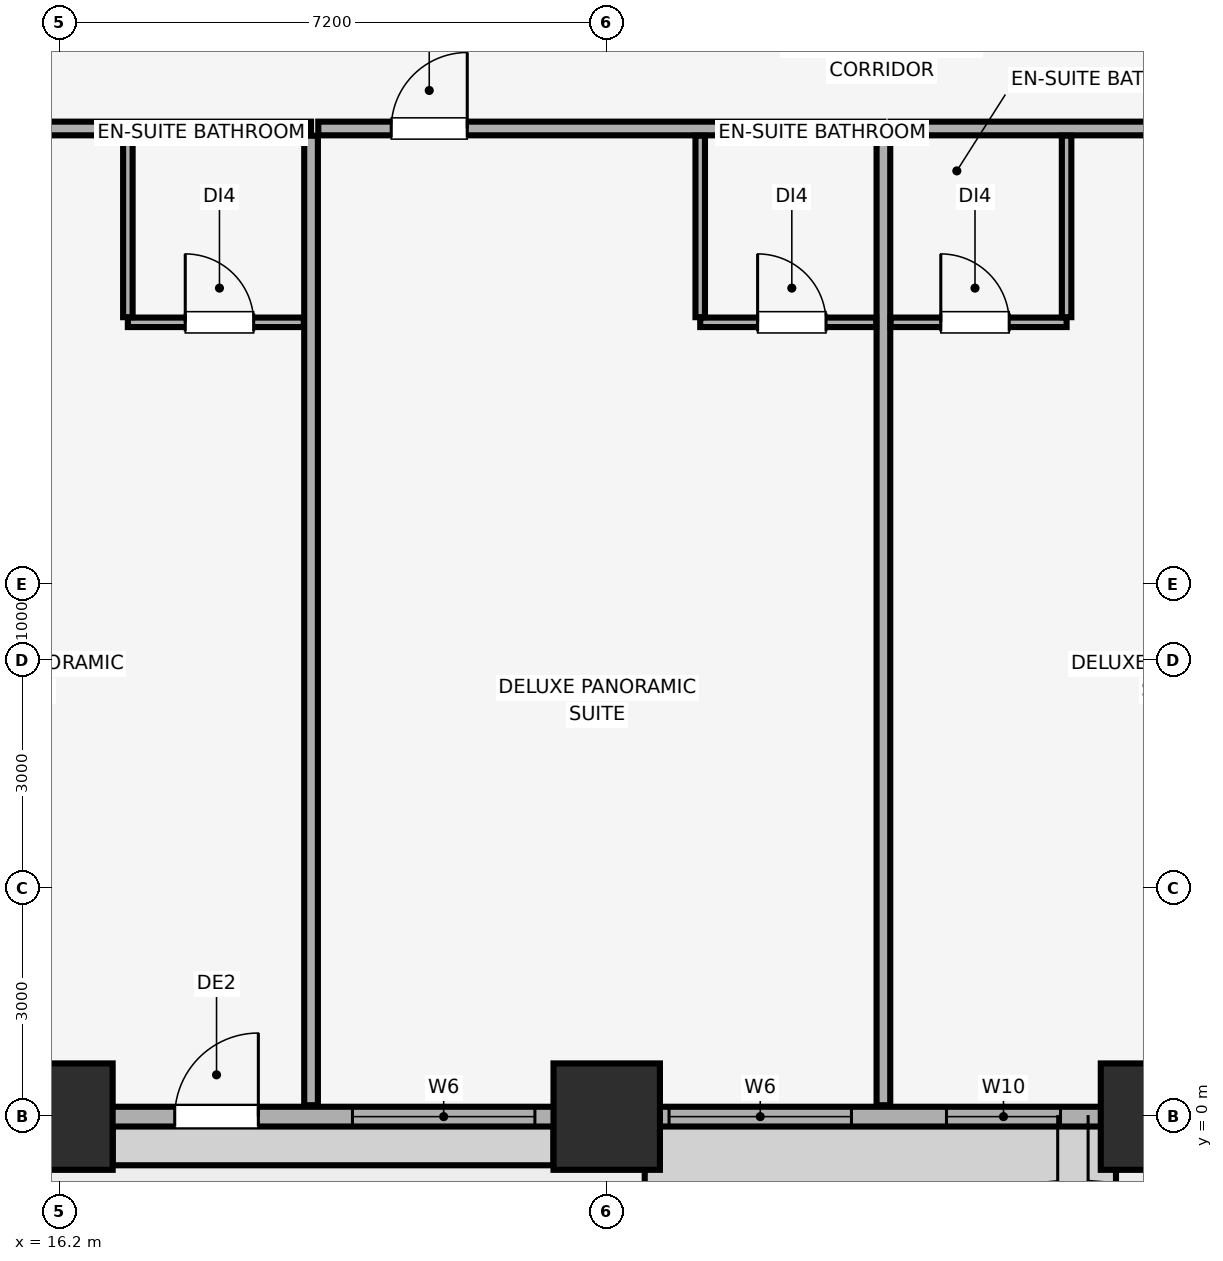
"""IFC4 building model, lengths in metres.
Left out: names, types, materials, properties, quantities, classifications, styles, units other than length and angle.
Written with IfcOpenShell. Run it as: python <this file> out.ifc"""

import sys

from ifc_helpers import new_model, si_unit, direction, frame, frame_2d, origin, origin_2d, place, context, subcontext, project, spatial, rectangle, extrude, element, fill, save


model = new_model("IFC4")
c1 = context("Model", 3, precision=1e-05, world=origin(), true_north=direction((0.0, 1.0)))
c2 = subcontext(c1, "Body", "Model", "MODEL_VIEW")
j1 = project(units=[si_unit("LENGTHUNIT", "METRE"), si_unit("PLANEANGLEUNIT", "RADIAN")], contexts=[c1])
p1 = place(None, origin())
s1 = spatial("IfcSite", under=j1, at=p1, CompositionType="ELEMENT")
p2 = place(p1, origin())
s2 = spatial("IfcBuilding", under=s1, at=p2, CompositionType="ELEMENT")
p3 = place(p2, frame((0.0, 0.0, 68.9)))
s3 = spatial("IfcBuildingStorey", under=s2, at=p3, CompositionType="ELEMENT", Elevation=68.9)
for number, where, z_axis, x_axis in (
    (1, (16.2, 0.0, 0.0), (0.0, 0.0, 1.0), (1.0, 0.0, 0.0)),
    (2, (23.4, 0.0, 0.0), (0.0, 0.0, 1.0), (1.0, 0.0, 0.0)),
    (3, (30.6, 0.0, 0.0), (0.0, 0.0, 1.0), (1.0, 0.0, 0.0)),
):
    element("IfcColumn", number, at=place(p3, frame(where, z_axis=z_axis, x_axis=x_axis)), inside=s3, PredefinedType="COLUMN", context=c2, shape_type="SweptSolid", body=[
        extrude(rectangle(XDim=1.4, YDim=1.4, at=origin_2d()), origin(), (0.0, 0.0, 1.0), 3.51),
    ])
p4 = place(p3, frame((4.2, 0.0, 0.0), z_axis=(0.0, 0.0, 1.0), x_axis=(1.0, 0.0, 0.0)))
e4 = element("IfcWall", 4, at=p4, inside=s3, PredefinedType="SOLIDWALL", context=c2, shape_type="SweptSolid", body=[
    extrude(rectangle(XDim=75.6, YDim=0.26, at=frame_2d((37.8, 0.0))), origin(), (0.0, 0.0, 1.0), 2.56),
])
p5 = place(p4, frame((13.517, 0.0, 0.0)))
e5 = element("IfcOpeningElement", 5, at=p5, cuts=e4, PredefinedType="OPENING", context=c2, shape_type="SweptSolid", body=[
    extrude(rectangle(XDim=1.1, YDim=2.15, at=frame_2d((0.55, 1.075))), frame((0.0, 0.14, 0.0), z_axis=(0.0, -1.0, 0.0), x_axis=(1.0, 0.0, 0.0)), (0.0, 0.0, 1.0), 0.28),
])
p6 = place(p4, frame((28.183, 0.0, 0.0)))
e6 = element("IfcOpeningElement", 6, at=p6, cuts=e4, PredefinedType="OPENING", context=c2, shape_type="SweptSolid", body=[
    extrude(rectangle(XDim=1.1, YDim=2.15, at=frame_2d((0.55, 1.075))), frame((0.0, 0.14, 0.0), z_axis=(0.0, -1.0, 0.0), x_axis=(1.0, 0.0, 0.0)), (0.0, 0.0, 1.0), 0.28),
])
p7 = place(p4, frame((58.094, 0.0, 0.0)))
e7 = element("IfcOpeningElement", 7, at=p7, cuts=e4, PredefinedType="OPENING", context=c2, shape_type="SweptSolid", body=[
    extrude(rectangle(XDim=1.1, YDim=2.15, at=frame_2d((0.55, 1.075))), frame((0.0, 0.14, 0.0), z_axis=(0.0, -1.0, 0.0), x_axis=(1.0, 0.0, 0.0)), (0.0, 0.0, 1.0), 0.28),
])
p8 = place(p4, frame((1.035, 0.0, 0.85)))
e8 = element("IfcOpeningElement", 8, at=p8, cuts=e4, PredefinedType="OPENING", context=c2, shape_type="SweptSolid", body=[
    extrude(rectangle(XDim=2.4, YDim=1.5, at=frame_2d((1.2, 0.75))), frame((0.0, 0.14, 0.0), z_axis=(0.0, -1.0, 0.0), x_axis=(1.0, 0.0, 0.0)), (0.0, 0.0, 1.0), 0.28),
])
p9 = place(p4, frame((5.74, 0.0, 0.85)))
e9 = element("IfcOpeningElement", 9, at=p9, cuts=e4, PredefinedType="OPENING", context=c2, shape_type="SweptSolid", body=[
    extrude(rectangle(XDim=1.5, YDim=1.4, at=frame_2d((0.75, 0.7))), frame((0.0, 0.14, 0.0), z_axis=(0.0, -1.0, 0.0), x_axis=(1.0, 0.0, 0.0)), (0.0, 0.0, 1.0), 0.28),
])
p10 = place(p4, frame((8.49, 0.0, 0.85)))
e10 = element("IfcOpeningElement", 10, at=p10, cuts=e4, PredefinedType="OPENING", context=c2, shape_type="SweptSolid", body=[
    extrude(rectangle(XDim=2.4, YDim=1.5, at=frame_2d((1.2, 0.75))), frame((0.0, 0.14, 0.0), z_axis=(0.0, -1.0, 0.0), x_axis=(1.0, 0.0, 0.0)), (0.0, 0.0, 1.0), 0.28),
])
p11 = place(p4, frame((15.855, 0.0, 0.85)))
e11 = element("IfcOpeningElement", 11, at=p11, cuts=e4, PredefinedType="OPENING", context=c2, shape_type="SweptSolid", body=[
    extrude(rectangle(XDim=2.4, YDim=1.5, at=frame_2d((1.2, 0.75))), frame((0.0, 0.14, 0.0), z_axis=(0.0, -1.0, 0.0), x_axis=(1.0, 0.0, 0.0)), (0.0, 0.0, 1.0), 0.28),
])
p12 = place(p4, frame((20.02, 0.0, 0.85)))
e12 = element("IfcOpeningElement", 12, at=p12, cuts=e4, PredefinedType="OPENING", context=c2, shape_type="SweptSolid", body=[
    extrude(rectangle(XDim=2.4, YDim=1.5, at=frame_2d((1.2, 0.75))), frame((0.0, 0.14, 0.0), z_axis=(0.0, -1.0, 0.0), x_axis=(1.0, 0.0, 0.0)), (0.0, 0.0, 1.0), 0.28),
])
p13 = place(p4, frame((23.67, 0.0, 0.85)))
e13 = element("IfcOpeningElement", 13, at=p13, cuts=e4, PredefinedType="OPENING", context=c2, shape_type="SweptSolid", body=[
    extrude(rectangle(XDim=1.5, YDim=1.4, at=frame_2d((0.75, 0.7))), frame((0.0, 0.14, 0.0), z_axis=(0.0, -1.0, 0.0), x_axis=(1.0, 0.0, 0.0)), (0.0, 0.0, 1.0), 0.28),
])
p14 = place(p4, frame((31.035, 0.0, 0.85)))
e14 = element("IfcOpeningElement", 14, at=p14, cuts=e4, PredefinedType="OPENING", context=c2, shape_type="SweptSolid", body=[
    extrude(rectangle(XDim=1.5, YDim=1.4, at=frame_2d((0.75, 0.7))), frame((0.0, 0.14, 0.0), z_axis=(0.0, -1.0, 0.0), x_axis=(1.0, 0.0, 0.0)), (0.0, 0.0, 1.0), 0.28),
])
p15 = place(p4, frame((34.75, 0.0, 0.85)))
e15 = element("IfcOpeningElement", 15, at=p15, cuts=e4, PredefinedType="OPENING", context=c2, shape_type="SweptSolid", body=[
    extrude(rectangle(XDim=2.4, YDim=1.5, at=frame_2d((1.2, 0.75))), frame((0.0, 0.14, 0.0), z_axis=(0.0, -1.0, 0.0), x_axis=(1.0, 0.0, 0.0)), (0.0, 0.0, 1.0), 0.28),
])
p16 = place(p4, frame((38.55, 0.0, 0.85)))
e16 = element("IfcOpeningElement", 16, at=p16, cuts=e4, PredefinedType="OPENING", context=c2, shape_type="SweptSolid", body=[
    extrude(rectangle(XDim=2.4, YDim=1.5, at=frame_2d((1.2, 0.75))), frame((0.0, 0.14, 0.0), z_axis=(0.0, -1.0, 0.0), x_axis=(1.0, 0.0, 0.0)), (0.0, 0.0, 1.0), 0.28),
])
p17 = place(p4, frame((43.165, 0.0, 0.85)))
e17 = element("IfcOpeningElement", 17, at=p17, cuts=e4, PredefinedType="OPENING", context=c2, shape_type="SweptSolid", body=[
    extrude(rectangle(XDim=1.5, YDim=1.4, at=frame_2d((0.75, 0.7))), frame((0.0, 0.14, 0.0), z_axis=(0.0, -1.0, 0.0), x_axis=(1.0, 0.0, 0.0)), (0.0, 0.0, 1.0), 0.28),
])
p18 = place(p4, frame((45.915, 0.0, 0.85)))
e18 = element("IfcOpeningElement", 18, at=p18, cuts=e4, PredefinedType="OPENING", context=c2, shape_type="SweptSolid", body=[
    extrude(rectangle(XDim=2.4, YDim=1.5, at=frame_2d((1.2, 0.75))), frame((0.0, 0.14, 0.0), z_axis=(0.0, -1.0, 0.0), x_axis=(1.0, 0.0, 0.0)), (0.0, 0.0, 1.0), 0.28),
])
p19 = place(p4, frame((50.081, 0.0, 0.85)))
e19 = element("IfcOpeningElement", 19, at=p19, cuts=e4, PredefinedType="OPENING", context=c2, shape_type="SweptSolid", body=[
    extrude(rectangle(XDim=2.4, YDim=1.5, at=frame_2d((1.2, 0.75))), frame((0.0, 0.14, 0.0), z_axis=(0.0, -1.0, 0.0), x_axis=(1.0, 0.0, 0.0)), (0.0, 0.0, 1.0), 0.28),
])
p20 = place(p4, frame((53.73, 0.0, 0.85)))
e20 = element("IfcOpeningElement", 20, at=p20, cuts=e4, PredefinedType="OPENING", context=c2, shape_type="SweptSolid", body=[
    extrude(rectangle(XDim=1.5, YDim=1.4, at=frame_2d((0.75, 0.7))), frame((0.0, 0.14, 0.0), z_axis=(0.0, -1.0, 0.0), x_axis=(1.0, 0.0, 0.0)), (0.0, 0.0, 1.0), 0.28),
])
p21 = place(p4, frame((61.095, 0.0, 0.85)))
e21 = element("IfcOpeningElement", 21, at=p21, cuts=e4, PredefinedType="OPENING", context=c2, shape_type="SweptSolid", body=[
    extrude(rectangle(XDim=1.5, YDim=1.4, at=frame_2d((0.75, 0.7))), frame((0.0, 0.14, 0.0), z_axis=(0.0, -1.0, 0.0), x_axis=(1.0, 0.0, 0.0)), (0.0, 0.0, 1.0), 0.28),
])
p22 = place(p4, frame((64.76, 0.0, 0.85)))
e22 = element("IfcOpeningElement", 22, at=p22, cuts=e4, PredefinedType="OPENING", context=c2, shape_type="SweptSolid", body=[
    extrude(rectangle(XDim=2.4, YDim=1.5, at=frame_2d((1.2, 0.75))), frame((0.0, 0.14, 0.0), z_axis=(0.0, -1.0, 0.0), x_axis=(1.0, 0.0, 0.0)), (0.0, 0.0, 1.0), 0.28),
])
p23 = place(p4, frame((68.41, 0.0, 0.85)))
e23 = element("IfcOpeningElement", 23, at=p23, cuts=e4, PredefinedType="OPENING", context=c2, shape_type="SweptSolid", body=[
    extrude(rectangle(XDim=1.5, YDim=1.4, at=frame_2d((0.75, 0.7))), frame((0.0, 0.14, 0.0), z_axis=(0.0, -1.0, 0.0), x_axis=(1.0, 0.0, 0.0)), (0.0, 0.0, 1.0), 0.28),
])
p24 = place(p4, frame((72.165, 0.0, 0.85)))
e24 = element("IfcOpeningElement", 24, at=p24, cuts=e4, PredefinedType="OPENING", context=c2, shape_type="SweptSolid", body=[
    extrude(rectangle(XDim=2.4, YDim=1.5, at=frame_2d((1.2, 0.75))), frame((0.0, 0.14, 0.0), z_axis=(0.0, -1.0, 0.0), x_axis=(1.0, 0.0, 0.0)), (0.0, 0.0, 1.0), 0.28),
])
p25 = place(p3, frame((12.075, 13.0, 0.0), z_axis=(0.0, 0.0, 1.0), x_axis=(1.0, 0.0, 0.0)))
e25 = element("IfcWall", 25, at=p25, inside=s3, PredefinedType="PARTITIONING", context=c2, shape_type="SweptSolid", body=[
    extrude(rectangle(XDim=7.435, YDim=0.18, at=frame_2d((3.718, 0.0))), origin(), (0.0, 0.0, 1.0), 3.51),
])
p26 = place(p25, frame((1.125, 0.0, 0.0)))
e26 = element("IfcOpeningElement", 26, at=p26, cuts=e25, PredefinedType="OPENING", context=c2, shape_type="SweptSolid", body=[
    extrude(rectangle(XDim=1.0, YDim=2.15, at=frame_2d((0.5, 1.075))), frame((0.0, 0.1, 0.0), z_axis=(0.0, -1.0, 0.0), x_axis=(1.0, 0.0, 0.0)), (0.0, 0.0, 1.0), 0.2),
])
p27 = place(p3, frame((19.51, 0.15, 0.0), z_axis=(0.0, 0.0, 1.0), x_axis=(0.0, 1.0, 0.0)))
e27 = element("IfcWall", 27, at=p27, inside=s3, PredefinedType="PARTITIONING", context=c2, shape_type="SweptSolid", body=[
    extrude(rectangle(XDim=12.755, YDim=0.18, at=frame_2d((6.377, 0.0))), origin(), (0.0, 0.0, 1.0), 3.51),
])
p28 = place(p3, frame((17.1, 10.45, 0.0), z_axis=(0.0, 0.0, 1.0), x_axis=(1.0, 0.0, 0.0)))
e28 = element("IfcWall", 28, at=p28, inside=s3, PredefinedType="PARTITIONING", context=c2, shape_type="SweptSolid", body=[
    extrude(rectangle(XDim=2.315, YDim=0.125, at=frame_2d((1.158, 0.0))), origin(), (0.0, 0.0, 1.0), 3.51),
])
p29 = place(p28, frame((0.755, 0.0, 0.0)))
e29 = element("IfcOpeningElement", 29, at=p29, cuts=e28, PredefinedType="OPENING", context=c2, shape_type="SweptSolid", body=[
    extrude(rectangle(XDim=0.9, YDim=2.1, at=frame_2d((0.45, 1.05))), frame((0.0, 0.073, 0.0), z_axis=(0.0, -1.0, 0.0), x_axis=(1.0, 0.0, 0.0)), (0.0, 0.0, 1.0), 0.145),
])
p30 = place(p3, frame((17.1, 10.518, 0.0), z_axis=(0.0, 0.0, 1.0), x_axis=(0.0, 1.0, 0.0)))
e30 = element("IfcWall", 30, at=p30, inside=s3, PredefinedType="PARTITIONING", context=c2, shape_type="SweptSolid", body=[
    extrude(rectangle(XDim=2.387, YDim=0.125, at=frame_2d((1.194, 0.0))), origin(), (0.0, 0.0, 1.0), 3.51),
])
p31 = place(p3, frame((19.605, 13.0, 0.0), z_axis=(0.0, 0.0, 1.0), x_axis=(1.0, 0.0, 0.0)))
e31 = element("IfcWall", 31, at=p31, inside=s3, PredefinedType="PARTITIONING", context=c2, shape_type="SweptSolid", body=[
    extrude(rectangle(XDim=7.435, YDim=0.18, at=frame_2d((3.718, 0.0))), origin(), (0.0, 0.0, 1.0), 3.51),
])
p32 = place(p31, frame((0.96, 0.0, 0.0)))
e32 = element("IfcOpeningElement", 32, at=p32, cuts=e31, PredefinedType="OPENING", context=c2, shape_type="SweptSolid", body=[
    extrude(rectangle(XDim=1.0, YDim=2.15, at=frame_2d((0.5, 1.075))), frame((0.0, 0.1, 0.0), z_axis=(0.0, -1.0, 0.0), x_axis=(1.0, 0.0, 0.0)), (0.0, 0.0, 1.0), 0.2),
])
p33 = place(p3, frame((27.04, 0.15, 0.0), z_axis=(0.0, 0.0, 1.0), x_axis=(0.0, 1.0, 0.0)))
e33 = element("IfcWall", 33, at=p33, inside=s3, PredefinedType="PARTITIONING", context=c2, shape_type="SweptSolid", body=[
    extrude(rectangle(XDim=12.755, YDim=0.18, at=frame_2d((6.377, 0.0))), origin(), (0.0, 0.0, 1.0), 2.898),
])
p34 = place(p3, frame((24.63, 10.45, 0.0), z_axis=(0.0, 0.0, 1.0), x_axis=(1.0, 0.0, 0.0)))
e34 = element("IfcWall", 34, at=p34, inside=s3, PredefinedType="PARTITIONING", context=c2, shape_type="SweptSolid", body=[
    extrude(rectangle(XDim=2.315, YDim=0.125, at=frame_2d((1.158, 0.0))), origin(), (0.0, 0.0, 1.0), 3.51),
])
p35 = place(p34, frame((0.755, 0.0, 0.0)))
e35 = element("IfcOpeningElement", 35, at=p35, cuts=e34, PredefinedType="OPENING", context=c2, shape_type="SweptSolid", body=[
    extrude(rectangle(XDim=0.9, YDim=2.1, at=frame_2d((0.45, 1.05))), frame((0.0, 0.073, 0.0), z_axis=(0.0, -1.0, 0.0), x_axis=(1.0, 0.0, 0.0)), (0.0, 0.0, 1.0), 0.145),
])
p36 = place(p3, frame((24.63, 10.518, 0.0), z_axis=(0.0, 0.0, 1.0), x_axis=(0.0, 1.0, 0.0)))
e36 = element("IfcWall", 36, at=p36, inside=s3, PredefinedType="PARTITIONING", context=c2, shape_type="SweptSolid", body=[
    extrude(rectangle(XDim=2.387, YDim=0.125, at=frame_2d((1.194, 0.0))), origin(), (0.0, 0.0, 1.0), 3.51),
])
p37 = place(p3, frame((27.135, 13.0, 0.0), z_axis=(0.0, 0.0, 1.0), x_axis=(1.0, 0.0, 0.0)))
e37 = element("IfcWall", 37, at=p37, inside=s3, PredefinedType="PARTITIONING", context=c2, shape_type="SweptSolid", body=[
    extrude(rectangle(XDim=7.435, YDim=0.18, at=frame_2d((3.718, 0.0))), origin(), (0.0, 0.0, 1.0), 3.51),
])
p38 = place(p37, frame((5.34, 0.0, 0.0)))
e38 = element("IfcOpeningElement", 38, at=p38, cuts=e37, PredefinedType="OPENING", context=c2, shape_type="SweptSolid", body=[
    extrude(rectangle(XDim=1.0, YDim=2.15, at=frame_2d((0.5, 1.075))), frame((0.0, 0.1, 0.0), z_axis=(0.0, -1.0, 0.0), x_axis=(1.0, 0.0, 0.0)), (0.0, 0.0, 1.0), 0.2),
])
p39 = place(p3, frame((27.135, 10.45, 0.0), z_axis=(0.0, 0.0, 1.0), x_axis=(1.0, 0.0, 0.0)))
e39 = element("IfcWall", 39, at=p39, inside=s3, PredefinedType="PARTITIONING", context=c2, shape_type="SweptSolid", body=[
    extrude(rectangle(XDim=2.315, YDim=0.125, at=frame_2d((1.157, 0.0))), origin(), (0.0, 0.0, 1.0), 3.51),
])
p40 = place(p39, frame((0.66, 0.0, 0.0)))
e40 = element("IfcOpeningElement", 40, at=p40, cuts=e39, PredefinedType="OPENING", context=c2, shape_type="SweptSolid", body=[
    extrude(rectangle(XDim=0.9, YDim=2.1, at=frame_2d((0.45, 1.05))), frame((0.0, 0.073, 0.0), z_axis=(0.0, -1.0, 0.0), x_axis=(1.0, 0.0, 0.0)), (0.0, 0.0, 1.0), 0.145),
])
p41 = place(p3, frame((29.45, 10.518, 0.0), z_axis=(0.0, 0.0, 1.0), x_axis=(0.0, 1.0, 0.0)))
e41 = element("IfcWall", 41, at=p41, inside=s3, PredefinedType="PARTITIONING", context=c2, shape_type="SweptSolid", body=[
    extrude(rectangle(XDim=2.387, YDim=0.125, at=frame_2d((1.194, 0.0))), origin(), (0.0, 0.0, 1.0), 3.51),
])
p42 = place(p5, origin())
e42 = element("IfcDoor", 42, at=p42, inside=s3, OperationType="SINGLE_SWING_RIGHT", PredefinedType="DOOR", context=c2, shape_type="SweptSolid", body=[
    extrude(rectangle(XDim=1.1, YDim=2.15, at=frame_2d((0.55, 1.075))), frame((0.0, 0.025, 0.0), z_axis=(0.0, -1.0, 0.0), x_axis=(1.0, 0.0, 0.0)), (0.0, 0.0, 1.0), 0.05),
])
fill(e5, e42)
p43 = place(p11, origin())
e43 = element("IfcWindow", 43, at=p43, inside=s3, PartitioningType="SINGLE_PANEL", PredefinedType="WINDOW", context=c2, shape_type="SweptSolid", body=[
    extrude(rectangle(XDim=2.4, YDim=1.5, at=frame_2d((1.2, 0.75))), frame((0.0, 0.03, 0.0), z_axis=(0.0, -1.0, 0.0), x_axis=(1.0, 0.0, 0.0)), (0.0, 0.0, 1.0), 0.06),
])
fill(e11, e43)
p44 = place(p12, origin())
e44 = element("IfcWindow", 44, at=p44, inside=s3, PartitioningType="SINGLE_PANEL", PredefinedType="WINDOW", context=c2, shape_type="SweptSolid", body=[
    extrude(rectangle(XDim=2.4, YDim=1.5, at=frame_2d((1.2, 0.75))), frame((0.0, 0.03, 0.0), z_axis=(0.0, -1.0, 0.0), x_axis=(1.0, 0.0, 0.0)), (0.0, 0.0, 1.0), 0.06),
])
fill(e12, e44)
p45 = place(p13, origin())
e45 = element("IfcWindow", 45, at=p45, inside=s3, PartitioningType="SINGLE_PANEL", PredefinedType="WINDOW", context=c2, shape_type="SweptSolid", body=[
    extrude(rectangle(XDim=1.5, YDim=1.4, at=frame_2d((0.75, 0.7))), frame((0.0, 0.03, 0.0), z_axis=(0.0, -1.0, 0.0), x_axis=(1.0, 0.0, 0.0)), (0.0, 0.0, 1.0), 0.06),
])
fill(e13, e45)
p46 = place(p29, origin())
e46 = element("IfcDoor", 46, at=p46, inside=s3, OperationType="SINGLE_SWING_LEFT", PredefinedType="DOOR", context=c2, shape_type="SweptSolid", body=[
    extrude(rectangle(XDim=0.9, YDim=2.1, at=frame_2d((0.45, 1.05))), frame((0.0, 0.025, 0.0), z_axis=(0.0, -1.0, 0.0), x_axis=(1.0, 0.0, 0.0)), (0.0, 0.0, 1.0), 0.05),
])
fill(e29, e46)
p47 = place(p32, origin())
e47 = element("IfcDoor", 47, at=p47, inside=s3, OperationType="SINGLE_SWING_RIGHT", PredefinedType="DOOR", context=c2, shape_type="SweptSolid", body=[
    extrude(rectangle(XDim=1.0, YDim=2.15, at=frame_2d((0.5, 1.075))), frame((0.0, 0.025, 0.0), z_axis=(0.0, -1.0, 0.0), x_axis=(1.0, 0.0, 0.0)), (0.0, 0.0, 1.0), 0.05),
])
fill(e32, e47)
p48 = place(p35, origin())
e48 = element("IfcDoor", 48, at=p48, inside=s3, OperationType="SINGLE_SWING_LEFT", PredefinedType="DOOR", context=c2, shape_type="SweptSolid", body=[
    extrude(rectangle(XDim=0.9, YDim=2.1, at=frame_2d((0.45, 1.05))), frame((0.0, 0.025, 0.0), z_axis=(0.0, -1.0, 0.0), x_axis=(1.0, 0.0, 0.0)), (0.0, 0.0, 1.0), 0.05),
])
fill(e35, e48)
p49 = place(p40, origin())
e49 = element("IfcDoor", 49, at=p49, inside=s3, OperationType="SINGLE_SWING_LEFT", PredefinedType="DOOR", context=c2, shape_type="SweptSolid", body=[
    extrude(rectangle(XDim=0.9, YDim=2.1, at=frame_2d((0.45, 1.05))), frame((0.0, 0.025, 0.0), z_axis=(0.0, -1.0, 0.0), x_axis=(1.0, 0.0, 0.0)), (0.0, 0.0, 1.0), 0.05),
])
fill(e40, e49)
save(model, sys.argv[1])
